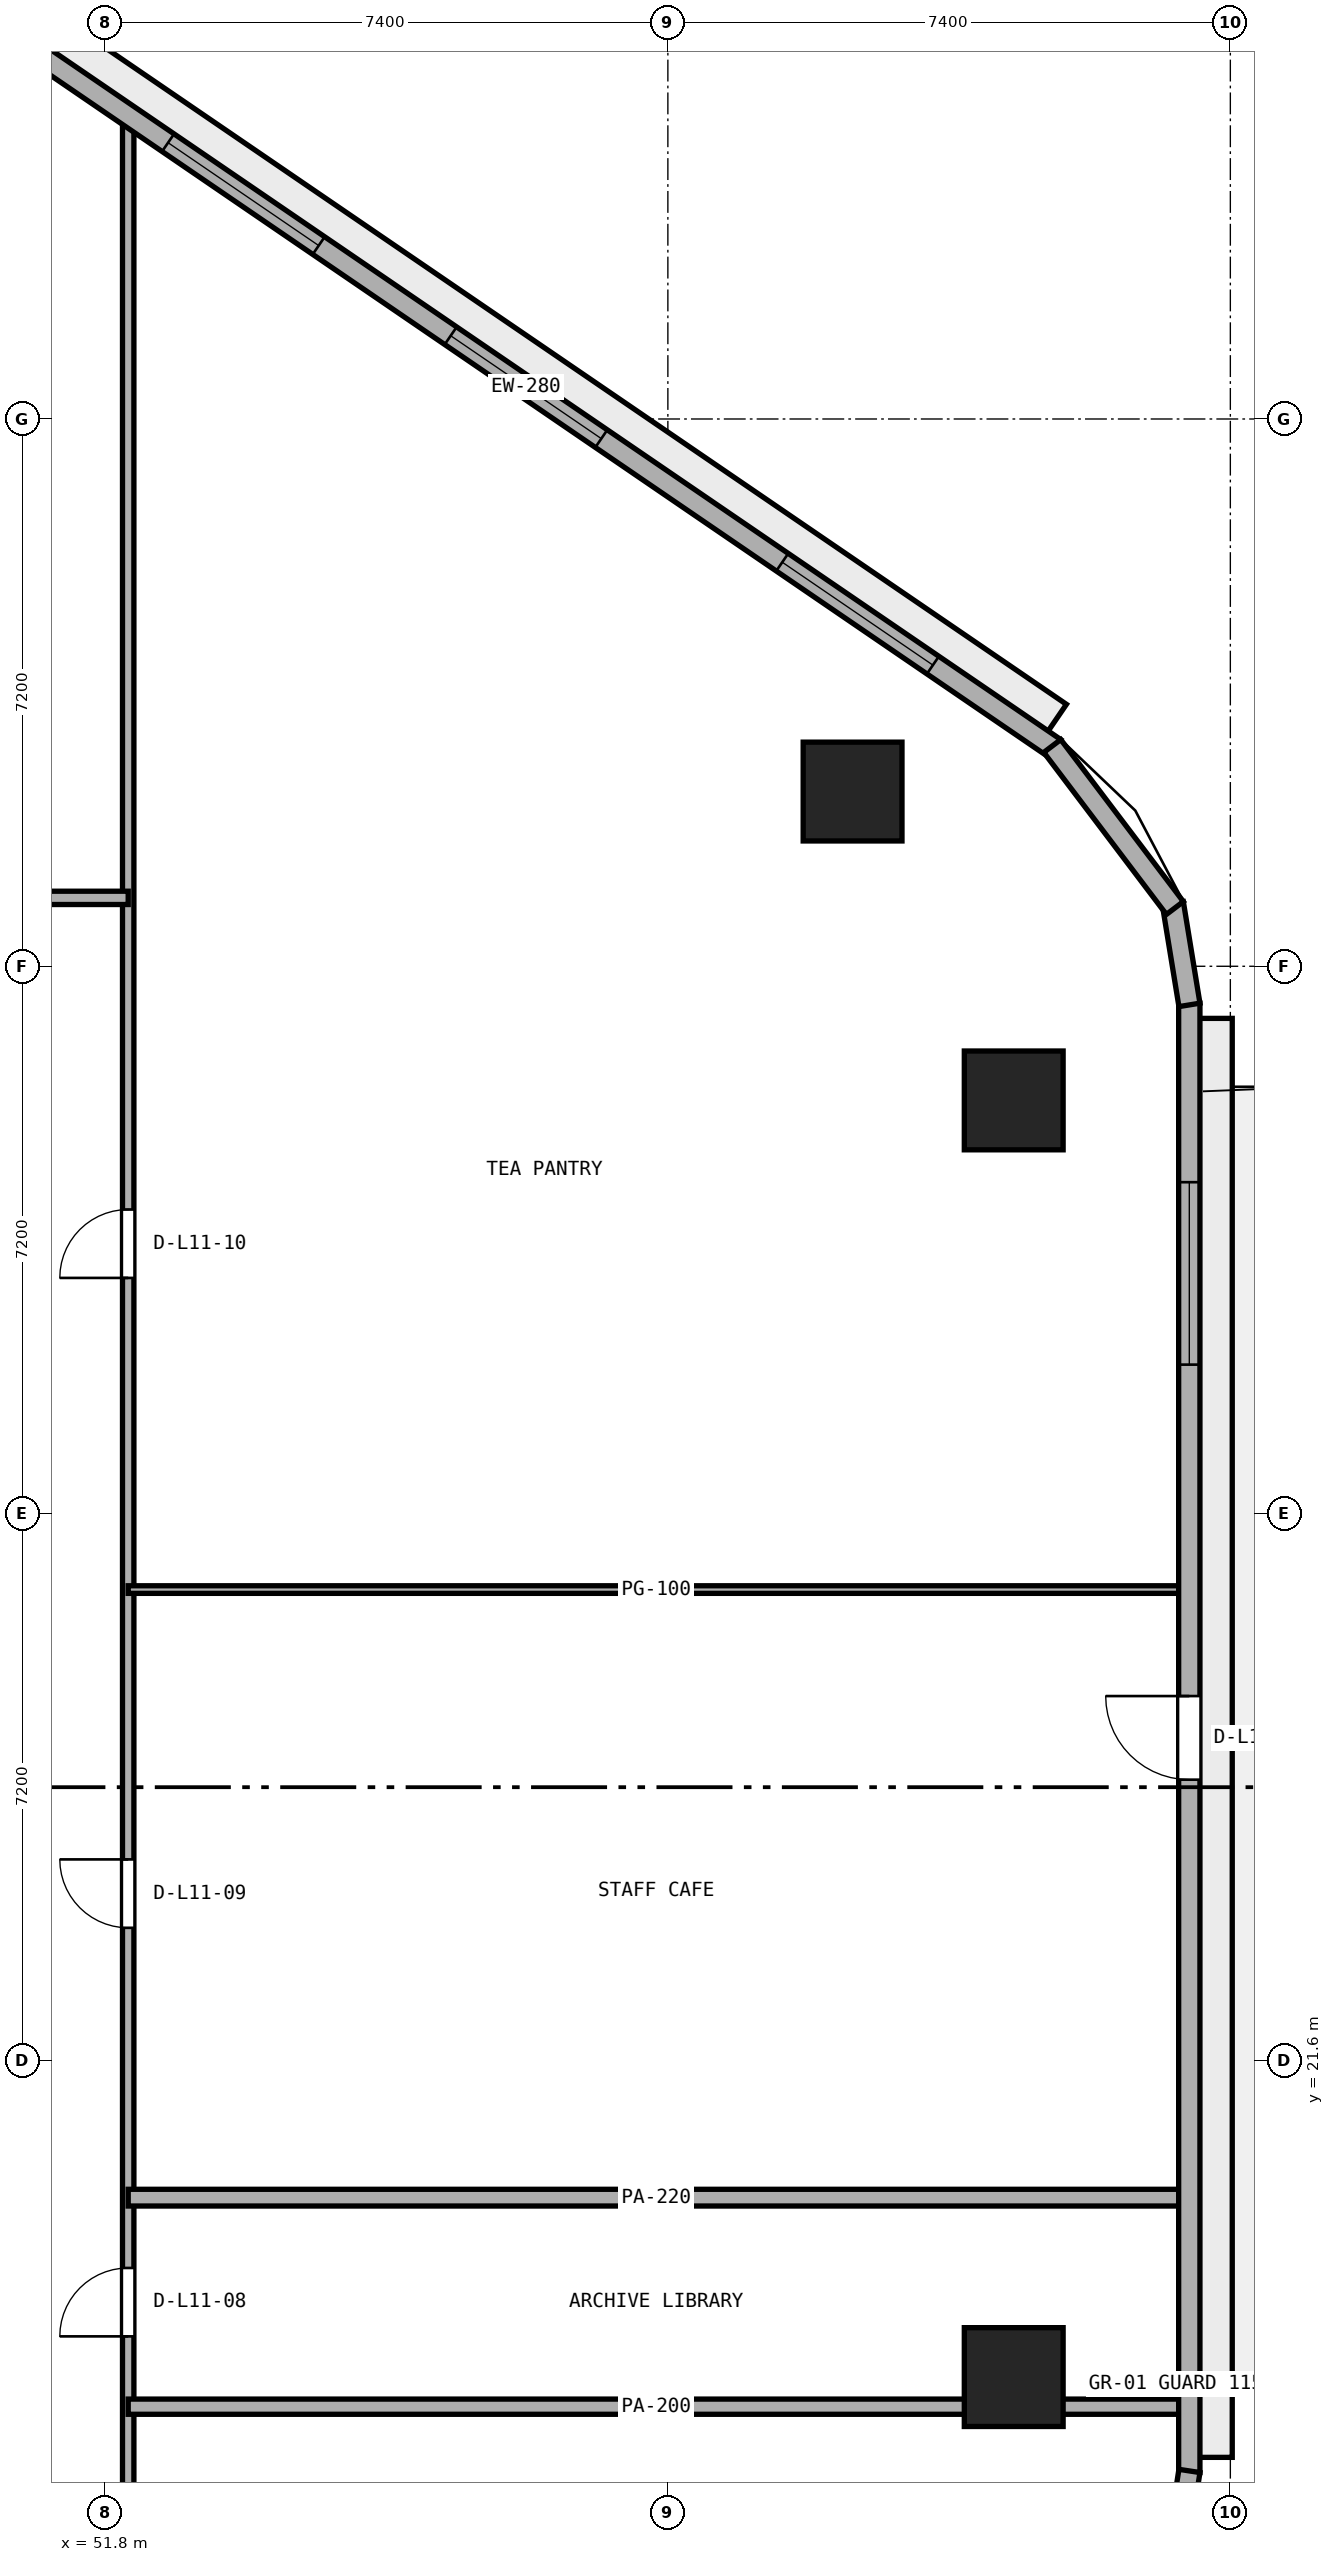
"""IFC4 building model, lengths in metres.
Left out: names, types, materials, properties, quantities, classifications, styles, units other than length and angle.
Written with IfcOpenShell. Run it as: python <this file> out.ifc"""

import sys

from ifc_helpers import new_model, si_unit, direction, frame, frame_2d, origin, origin_2d, place, context, subcontext, project, spatial, rectangle, extrude, element, fill, save


model = new_model("IFC4")
c1 = context("Model", 3, precision=1e-05, world=origin(), true_north=direction((0.0, 1.0)))
c2 = subcontext(c1, "Body", "Model", "MODEL_VIEW")
j1 = project(units=[si_unit("LENGTHUNIT", "METRE"), si_unit("PLANEANGLEUNIT", "RADIAN")], contexts=[c1])
p1 = place(None, origin())
s1 = spatial("IfcSite", under=j1, at=p1, CompositionType="ELEMENT")
p2 = place(p1, origin())
s2 = spatial("IfcBuilding", under=s1, at=p2, CompositionType="ELEMENT")
p3 = place(p2, frame((0.0, 0.0, 47.8)))
s3 = spatial("IfcBuildingStorey", under=s2, at=p3, CompositionType="ELEMENT", Elevation=47.8)
for number, where, z_axis, x_axis in (
    (1, (63.75, 17.44, 0.0), (0.0, 0.0, 1.0), (1.0, 0.0, 0.0)),
    (2, (63.75, 34.235, 0.0), (0.0, 0.0, 1.0), (1.0, 0.0, 0.0)),
    (3, (61.63, 38.299, 0.0), (0.0, 0.0, 1.0), (1.0, 0.0, 0.0)),
):
    element("IfcColumn", number, at=place(p3, frame(where, z_axis=z_axis, x_axis=x_axis)), inside=s3, PredefinedType="COLUMN", context=c2, shape_type="SweptSolid", body=[
        extrude(rectangle(XDim=1.3, YDim=1.3, at=origin_2d()), origin(), (0.0, 0.0, 1.0), 3.8),
    ])
p4 = place(p3, frame((52.1, 13.5, 0.0), z_axis=(0.0, 0.0, 1.0), x_axis=(0.0, 1.0, 0.0)))
e4 = element("IfcWall", 4, at=p4, inside=s3, PredefinedType="PARTITIONING", context=c2, shape_type="SweptSolid", body=[
    extrude(rectangle(XDim=33.723, YDim=0.15, at=frame_2d((16.861, 0.0))), origin(), (0.0, 0.0, 1.0), 3.525),
])
p5 = place(p4, frame((4.475, 0.0, 0.0)))
e5 = element("IfcOpeningElement", 5, at=p5, cuts=e4, PredefinedType="OPENING", context=c2, shape_type="SweptSolid", body=[
    extrude(rectangle(XDim=0.9, YDim=2.1, at=frame_2d((0.45, 1.05))), frame((0.0, 0.085, 0.0), z_axis=(0.0, -1.0, 0.0), x_axis=(1.0, 0.0, 0.0)), (0.0, 0.0, 1.0), 0.17),
])
p6 = place(p4, frame((9.85, 0.0, 0.0)))
e6 = element("IfcOpeningElement", 6, at=p6, cuts=e4, PredefinedType="OPENING", context=c2, shape_type="SweptSolid", body=[
    extrude(rectangle(XDim=0.9, YDim=2.1, at=frame_2d((0.45, 1.05))), frame((0.0, 0.085, 0.0), z_axis=(0.0, -1.0, 0.0), x_axis=(1.0, 0.0, 0.0)), (0.0, 0.0, 1.0), 0.17),
])
p7 = place(p4, frame((18.4, 0.0, 0.0)))
e7 = element("IfcOpeningElement", 7, at=p7, cuts=e4, PredefinedType="OPENING", context=c2, shape_type="SweptSolid", body=[
    extrude(rectangle(XDim=0.9, YDim=2.1, at=frame_2d((0.45, 1.05))), frame((0.0, 0.085, 0.0), z_axis=(0.0, -1.0, 0.0), x_axis=(1.0, 0.0, 0.0)), (0.0, 0.0, 1.0), 0.17),
])
p8 = place(p3, frame((52.1, 17.05, 0.0), z_axis=(0.0, 0.0, 1.0), x_axis=(1.0, 0.0, 0.0)))
e8 = element("IfcWall", 8, at=p8, inside=s3, PredefinedType="PARTITIONING", context=c2, shape_type="SweptSolid", body=[
    extrude(rectangle(XDim=13.895, YDim=0.2, at=frame_2d((6.948, 0.0))), origin(), (0.0, 0.0, 1.0), 3.525),
])
p9 = place(p3, frame((52.1, 19.8, 0.0), z_axis=(0.0, 0.0, 1.0), x_axis=(1.0, 0.0, 0.0)))
e9 = element("IfcWall", 9, at=p9, inside=s3, PredefinedType="PARTITIONING", context=c2, shape_type="SweptSolid", body=[
    extrude(rectangle(XDim=13.895, YDim=0.22, at=frame_2d((6.948, 0.0))), origin(), (0.0, 0.0, 1.0), 3.525),
])
p10 = place(p3, frame((52.1, 27.8, 0.0), z_axis=(0.0, 0.0, 1.0), x_axis=(1.0, 0.0, 0.0)))
e10 = element("IfcWall", 10, at=p10, inside=s3, PredefinedType="PARTITIONING", context=c2, shape_type="SweptSolid", body=[
    extrude(rectangle(XDim=13.895, YDim=0.1, at=frame_2d((6.948, 0.0))), origin(), (0.0, 0.0, 1.0), 3.525),
])
p11 = place(p3, frame((21.9, 36.9, 0.0), z_axis=(0.0, 0.0, 1.0), x_axis=(1.0, 0.0, 0.0)))
e11 = element("IfcWall", 11, at=p11, inside=s3, PredefinedType="PARTITIONING", context=c2, shape_type="SweptSolid", body=[
    extrude(rectangle(XDim=30.2, YDim=0.175, at=frame_2d((15.1, 0.0))), origin(), (0.0, 0.0, 1.0), 3.525),
])
p12 = place(p11, frame((4.87, 0.0, 0.0)))
e12 = element("IfcOpeningElement", 12, at=p12, cuts=e11, PredefinedType="OPENING", context=c2, shape_type="SweptSolid", body=[
    extrude(rectangle(XDim=1.0, YDim=2.12, at=frame_2d((0.5, 1.06))), frame((0.0, 0.097, 0.0), z_axis=(0.0, -1.0, 0.0), x_axis=(1.0, 0.0, 0.0)), (0.0, 0.0, 1.0), 0.195),
])
p13 = place(p11, frame((15.75, 0.0, 0.0)))
e13 = element("IfcOpeningElement", 13, at=p13, cuts=e11, PredefinedType="OPENING", context=c2, shape_type="SweptSolid", body=[
    extrude(rectangle(XDim=1.0, YDim=2.12, at=frame_2d((0.5, 1.06))), frame((0.0, 0.097, 0.0), z_axis=(0.0, -1.0, 0.0), x_axis=(1.0, 0.0, 0.0)), (0.0, 0.0, 1.0), 0.195),
])
p14 = place(p11, frame((25.48, 0.0, 0.0)))
e14 = element("IfcOpeningElement", 14, at=p14, cuts=e11, PredefinedType="OPENING", context=c2, shape_type="SweptSolid", body=[
    extrude(rectangle(XDim=1.0, YDim=2.12, at=frame_2d((0.5, 1.06))), frame((0.0, 0.097, 0.0), z_axis=(0.0, -1.0, 0.0), x_axis=(1.0, 0.0, 0.0)), (0.0, 0.0, 1.0), 0.195),
])
p15 = place(p3, frame((66.06, 16.183, 0.0), z_axis=(0.0, 0.0, 1.0), x_axis=(0.0, 1.0, 0.0)))
e15 = element("IfcWall", 15, at=p15, inside=s3, PredefinedType="STANDARD", context=c2, shape_type="SweptSolid", body=[
    extrude(rectangle(XDim=19.331, YDim=0.28, at=frame_2d((9.666, 0.0))), origin(), (0.0, 0.0, 1.0), 3.525),
])
p16 = place(p15, frame((9.115, 0.0, 0.0)))
e16 = element("IfcOpeningElement", 16, at=p16, cuts=e15, PredefinedType="OPENING", context=c2, shape_type="SweptSolid", body=[
    extrude(rectangle(XDim=1.1, YDim=2.2, at=frame_2d((0.55, 1.1))), frame((0.0, 0.15, 0.0), z_axis=(0.0, -1.0, 0.0), x_axis=(1.0, 0.0, 0.0)), (0.0, 0.0, 1.0), 0.3),
])
p17 = place(p15, frame((14.576, 0.0, 0.9)))
e17 = element("IfcOpeningElement", 17, at=p17, cuts=e15, PredefinedType="OPENING", context=c2, shape_type="SweptSolid", body=[
    extrude(rectangle(XDim=2.4, YDim=1.75, at=frame_2d((1.2, 0.875))), frame((0.0, 0.15, 0.0), z_axis=(0.0, -1.0, 0.0), x_axis=(1.0, 0.0, 0.0)), (0.0, 0.0, 1.0), 0.3),
])
p18 = place(p3, frame((64.29, 38.867, 0.0), z_axis=(0.0, 0.0, 1.0), x_axis=(-0.825755550159, 0.564028165416, 0.0)))
e18 = element("IfcWall", 18, at=p18, inside=s3, PredefinedType="STANDARD", context=c2, shape_type="SweptSolid", body=[
    extrude(rectangle(XDim=16.848, YDim=0.28, at=frame_2d((8.424, 0.0))), origin(), (0.0, 0.0, 1.0), 3.525),
])
p19 = place(p18, frame((1.941, 0.0, 0.9)))
e19 = element("IfcOpeningElement", 19, at=p19, cuts=e18, PredefinedType="OPENING", context=c2, shape_type="SweptSolid", body=[
    extrude(rectangle(XDim=2.4, YDim=1.75, at=frame_2d((1.2, 0.875))), frame((0.0, 0.15, 0.0), z_axis=(0.0, -1.0, 0.0), x_axis=(1.0, 0.0, 0.0)), (0.0, 0.0, 1.0), 0.3),
])
p20 = place(p18, frame((7.224, 0.0, 0.9)))
e20 = element("IfcOpeningElement", 20, at=p20, cuts=e18, PredefinedType="OPENING", context=c2, shape_type="SweptSolid", body=[
    extrude(rectangle(XDim=2.4, YDim=1.75, at=frame_2d((1.2, 0.875))), frame((0.0, 0.15, 0.0), z_axis=(0.0, -1.0, 0.0), x_axis=(1.0, 0.0, 0.0)), (0.0, 0.0, 1.0), 0.3),
])
p21 = place(p18, frame((11.727, 0.0, 0.9)))
e21 = element("IfcOpeningElement", 21, at=p21, cuts=e18, PredefinedType="OPENING", context=c2, shape_type="SweptSolid", body=[
    extrude(rectangle(XDim=2.4, YDim=1.75, at=frame_2d((1.2, 0.875))), frame((0.0, 0.15, 0.0), z_axis=(0.0, -1.0, 0.0), x_axis=(1.0, 0.0, 0.0)), (0.0, 0.0, 1.0), 0.3),
])
p22 = place(p3, frame((65.867, 14.943, 0.0), z_axis=(0.0, 0.0, 1.0), x_axis=(0.152014078361, 0.988378328364, 0.0)))
e22 = element("IfcWall", 22, at=p22, inside=s3, PredefinedType="STANDARD", context=c2, shape_type="SweptSolid", body=[
    extrude(rectangle(XDim=1.277, YDim=0.28, at=frame_2d((0.638, 0.0))), origin(), (0.0, 0.0, 1.0), 3.525),
])
p23 = place(p3, frame((66.062, 35.492, 0.0), z_axis=(0.0, 0.0, 1.0), x_axis=(-0.161182073582, 0.986924687682, 0.0)))
e23 = element("IfcWall", 23, at=p23, inside=s3, PredefinedType="STANDARD", context=c2, shape_type="SweptSolid", body=[
    extrude(rectangle(XDim=1.354, YDim=0.28, at=frame_2d((0.677, 0.0))), origin(), (0.0, 0.0, 1.0), 3.525),
])
p24 = place(p3, frame((65.87, 36.767, 0.0), z_axis=(0.0, 0.0, 1.0), x_axis=(-0.603370463754, 0.797461023166, 0.0)))
e24 = element("IfcWall", 24, at=p24, inside=s3, PredefinedType="STANDARD", context=c2, shape_type="SweptSolid", body=[
    extrude(rectangle(XDim=2.673, YDim=0.28, at=frame_2d((1.336, 0.0))), origin(), (0.0, 0.0, 1.0), 3.525),
])
p25 = place(p5, origin())
e25 = element("IfcDoor", 25, at=p25, inside=s3, OperationType="SINGLE_SWING_LEFT", PredefinedType="DOOR", context=c2, shape_type="SweptSolid", body=[
    extrude(rectangle(XDim=0.9, YDim=2.1, at=frame_2d((0.45, 1.05))), frame((0.0, 0.025, 0.0), z_axis=(0.0, -1.0, 0.0), x_axis=(1.0, 0.0, 0.0)), (0.0, 0.0, 1.0), 0.05),
])
fill(e5, e25)
p26 = place(p6, origin())
e26 = element("IfcDoor", 26, at=p26, inside=s3, OperationType="SINGLE_SWING_RIGHT", PredefinedType="DOOR", context=c2, shape_type="SweptSolid", body=[
    extrude(rectangle(XDim=0.9, YDim=2.1, at=frame_2d((0.45, 1.05))), frame((0.0, 0.025, 0.0), z_axis=(0.0, -1.0, 0.0), x_axis=(1.0, 0.0, 0.0)), (0.0, 0.0, 1.0), 0.05),
])
fill(e6, e26)
p27 = place(p7, origin())
e27 = element("IfcDoor", 27, at=p27, inside=s3, OperationType="SINGLE_SWING_LEFT", PredefinedType="DOOR", context=c2, shape_type="SweptSolid", body=[
    extrude(rectangle(XDim=0.9, YDim=2.1, at=frame_2d((0.45, 1.05))), frame((0.0, 0.025, 0.0), z_axis=(0.0, -1.0, 0.0), x_axis=(1.0, 0.0, 0.0)), (0.0, 0.0, 1.0), 0.05),
])
fill(e7, e27)
p28 = place(p16, origin())
e28 = element("IfcDoor", 28, at=p28, inside=s3, OperationType="SINGLE_SWING_RIGHT", PredefinedType="DOOR", context=c2, shape_type="SweptSolid", body=[
    extrude(rectangle(XDim=1.1, YDim=2.2, at=frame_2d((0.55, 1.1))), frame((0.0, 0.025, 0.0), z_axis=(0.0, -1.0, 0.0), x_axis=(1.0, 0.0, 0.0)), (0.0, 0.0, 1.0), 0.05),
])
fill(e16, e28)
p29 = place(p17, origin())
e29 = element("IfcWindow", 29, at=p29, inside=s3, PartitioningType="SINGLE_PANEL", PredefinedType="WINDOW", context=c2, shape_type="SweptSolid", body=[
    extrude(rectangle(XDim=2.4, YDim=1.75, at=frame_2d((1.2, 0.875))), frame((0.0, 0.03, 0.0), z_axis=(0.0, -1.0, 0.0), x_axis=(1.0, 0.0, 0.0)), (0.0, 0.0, 1.0), 0.06),
])
fill(e17, e29)
p30 = place(p19, origin())
e30 = element("IfcWindow", 30, at=p30, inside=s3, PartitioningType="SINGLE_PANEL", PredefinedType="WINDOW", context=c2, shape_type="SweptSolid", body=[
    extrude(rectangle(XDim=2.4, YDim=1.75, at=frame_2d((1.2, 0.875))), frame((0.0, 0.03, 0.0), z_axis=(0.0, -1.0, 0.0), x_axis=(1.0, 0.0, 0.0)), (0.0, 0.0, 1.0), 0.06),
])
fill(e19, e30)
p31 = place(p20, origin())
e31 = element("IfcWindow", 31, at=p31, inside=s3, PartitioningType="SINGLE_PANEL", PredefinedType="WINDOW", context=c2, shape_type="SweptSolid", body=[
    extrude(rectangle(XDim=2.4, YDim=1.75, at=frame_2d((1.2, 0.875))), frame((0.0, 0.03, 0.0), z_axis=(0.0, -1.0, 0.0), x_axis=(1.0, 0.0, 0.0)), (0.0, 0.0, 1.0), 0.06),
])
fill(e20, e31)
p32 = place(p21, origin())
e32 = element("IfcWindow", 32, at=p32, inside=s3, PartitioningType="SINGLE_PANEL", PredefinedType="WINDOW", context=c2, shape_type="SweptSolid", body=[
    extrude(rectangle(XDim=2.4, YDim=1.75, at=frame_2d((1.2, 0.875))), frame((0.0, 0.03, 0.0), z_axis=(0.0, -1.0, 0.0), x_axis=(1.0, 0.0, 0.0)), (0.0, 0.0, 1.0), 0.06),
])
fill(e21, e32)
save(model, sys.argv[1])
